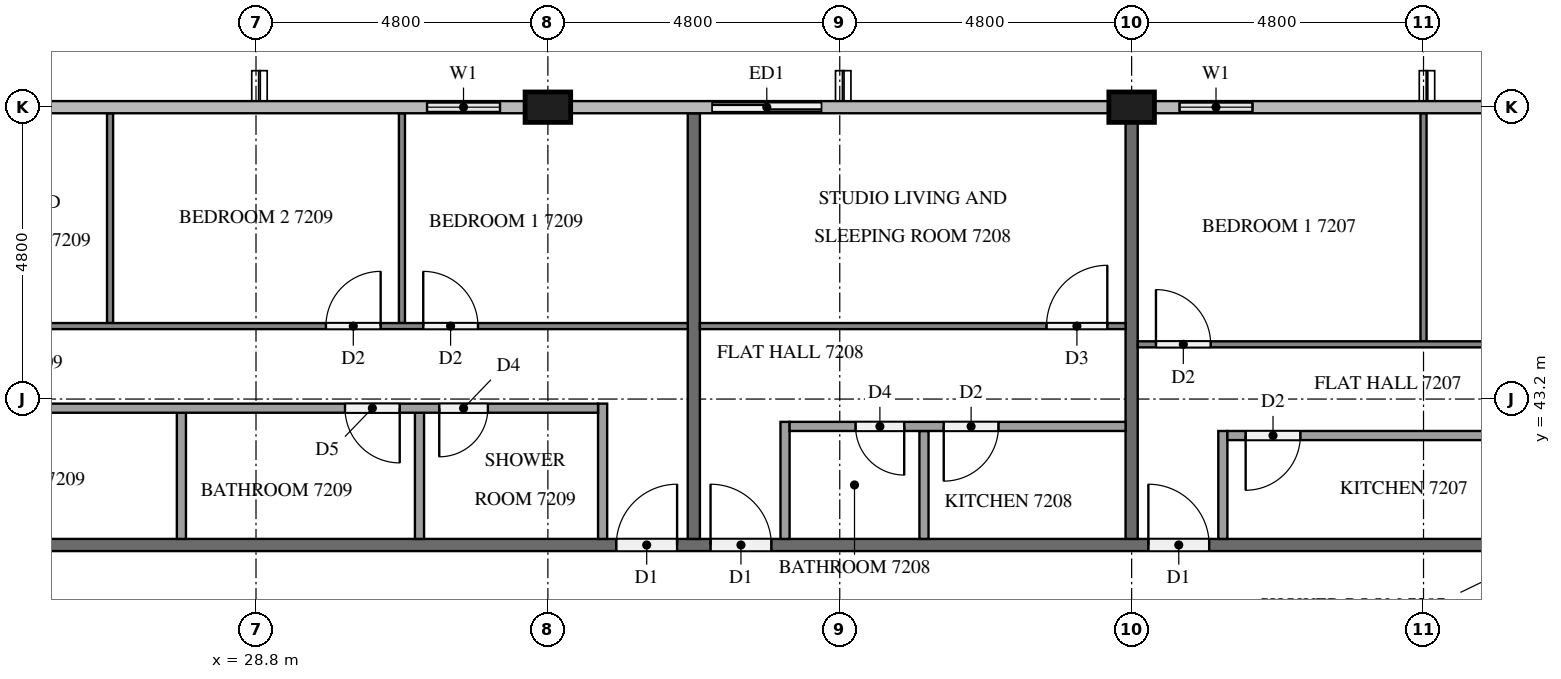
"""IFC4 building model, lengths in metres.
Left out: names, types, materials, properties, quantities, classifications, styles, units other than length and angle.
Written with IfcOpenShell. Run it as: python <this file> out.ifc"""

import sys

from ifc_helpers import new_model, si_unit, direction, frame, frame_2d, origin, origin_2d, place, context, subcontext, project, spatial, rectangle, extrude, element, fill, save


model = new_model("IFC4")
c1 = context("Model", 3, precision=1e-05, world=origin(), true_north=direction((0.0, 1.0)))
c2 = subcontext(c1, "Body", "Model", "MODEL_VIEW")
j1 = project(units=[si_unit("LENGTHUNIT", "METRE"), si_unit("PLANEANGLEUNIT", "RADIAN")], contexts=[c1])
p1 = place(None, origin())
s1 = spatial("IfcSite", under=j1, at=p1, CompositionType="ELEMENT")
p2 = place(p1, origin())
s2 = spatial("IfcBuilding", under=s1, at=p2, CompositionType="ELEMENT")
p3 = place(p2, frame((0.0, 0.0, 275.6)))
s3 = spatial("IfcBuildingStorey", under=s2, at=p3, CompositionType="ELEMENT", Elevation=275.6)
for number, where, z_axis, x_axis in (
    (1, (43.2, 48.0, 0.0), (0.0, 0.0, 1.0), (1.0, 0.0, 0.0)),
    (2, (33.6, 48.0, 0.0), (0.0, 0.0, 1.0), (1.0, 0.0, 0.0)),
):
    element("IfcColumn", number, at=place(p3, frame(where, z_axis=z_axis, x_axis=x_axis)), inside=s3, PredefinedType="COLUMN", context=c2, shape_type="SweptSolid", body=[
        extrude(rectangle(XDim=0.75, YDim=0.5, at=origin_2d()), origin(), (0.0, 0.0, 1.0), 3.2),
    ])
p4 = place(p3, frame((45.6, 48.0, 0.0), z_axis=(0.0, 0.0, 1.0), x_axis=(-1.0, 0.0, 0.0)))
e3 = element("IfcWall", 3, at=p4, inside=s3, PredefinedType="SOLIDWALL", context=c2, shape_type="SweptSolid", body=[
    extrude(rectangle(XDim=2.025, YDim=0.15, at=frame_2d((1.013, 0.0))), origin(), (0.0, 0.0, 1.0), 3.2),
])
p5 = place(p4, frame((0.413, 0.0, 0.9)))
e4 = element("IfcOpeningElement", 4, at=p5, cuts=e3, PredefinedType="OPENING", context=c2, shape_type="SweptSolid", body=[
    extrude(rectangle(XDim=1.2, YDim=1.4, at=frame_2d((0.6, 0.7))), frame((0.0, 0.085, 0.0), z_axis=(0.0, -1.0, 0.0), x_axis=(1.0, 0.0, 0.0)), (0.0, 0.0, 1.0), 0.17),
])
p6 = place(p3, frame((38.4, 48.0, 0.0), z_axis=(0.0, 0.0, 1.0), x_axis=(-1.0, 0.0, 0.0)))
e5 = element("IfcWall", 5, at=p6, inside=s3, PredefinedType="SOLIDWALL", context=c2, shape_type="SweptSolid", body=[
    extrude(rectangle(XDim=2.4, YDim=0.15, at=frame_2d((1.2, 0.0))), origin(), (0.0, 0.0, 1.0), 3.2),
])
p7 = place(p6, frame((0.3, 0.0, 0.0)))
e6 = element("IfcOpeningElement", 6, at=p7, cuts=e5, PredefinedType="OPENING", context=c2, shape_type="SweptSolid", body=[
    extrude(rectangle(XDim=1.8, YDim=2.4, at=frame_2d((0.9, 1.2))), frame((0.0, 0.085, 0.0), z_axis=(0.0, -1.0, 0.0), x_axis=(1.0, 0.0, 0.0)), (0.0, 0.0, 1.0), 0.17),
])
p8 = place(p3, frame((33.225, 48.0, 0.0), z_axis=(0.0, 0.0, 1.0), x_axis=(-1.0, 0.0, 0.0)))
e7 = element("IfcWall", 7, at=p8, inside=s3, PredefinedType="SOLIDWALL", context=c2, shape_type="SweptSolid", body=[
    extrude(rectangle(XDim=2.025, YDim=0.15, at=frame_2d((1.013, 0.0))), origin(), (0.0, 0.0, 1.0), 3.2),
])
p9 = place(p8, frame((0.413, 0.0, 0.9)))
e8 = element("IfcOpeningElement", 8, at=p9, cuts=e7, PredefinedType="OPENING", context=c2, shape_type="SweptSolid", body=[
    extrude(rectangle(XDim=1.2, YDim=1.4, at=frame_2d((0.6, 0.7))), frame((0.0, 0.085, 0.0), z_axis=(0.0, -1.0, 0.0), x_axis=(1.0, 0.0, 0.0)), (0.0, 0.0, 1.0), 0.17),
])
p10 = place(p3, frame((11.9, 40.8, 0.0), z_axis=(0.0, 0.0, 1.0), x_axis=(1.0, 0.0, 0.0)))
e9 = element("IfcWall", 9, at=p10, inside=s3, PredefinedType="PARTITIONING", context=c2, shape_type="SweptSolid", body=[
    extrude(rectangle(XDim=38.6, YDim=0.2, at=frame_2d((19.3, 0.0))), origin(), (0.0, 0.0, 1.0), 3.2),
])
p11 = place(p10, frame((31.575, 0.0, 0.0)))
e10 = element("IfcOpeningElement", 10, at=p11, cuts=e9, PredefinedType="OPENING", context=c2, shape_type="SweptSolid", body=[
    extrude(rectangle(XDim=1.0, YDim=2.1, at=frame_2d((0.5, 1.05))), frame((0.0, 0.11, 0.0), z_axis=(0.0, -1.0, 0.0), x_axis=(1.0, 0.0, 0.0)), (0.0, 0.0, 1.0), 0.22),
])
p12 = place(p10, frame((24.375, 0.0, 0.0)))
e11 = element("IfcOpeningElement", 11, at=p12, cuts=e9, PredefinedType="OPENING", context=c2, shape_type="SweptSolid", body=[
    extrude(rectangle(XDim=1.0, YDim=2.1, at=frame_2d((0.5, 1.05))), frame((0.0, 0.11, 0.0), z_axis=(0.0, -1.0, 0.0), x_axis=(1.0, 0.0, 0.0)), (0.0, 0.0, 1.0), 0.22),
])
p13 = place(p10, frame((22.825, 0.0, 0.0)))
e12 = element("IfcOpeningElement", 12, at=p13, cuts=e9, PredefinedType="OPENING", context=c2, shape_type="SweptSolid", body=[
    extrude(rectangle(XDim=1.0, YDim=2.1, at=frame_2d((0.5, 1.05))), frame((0.0, 0.11, 0.0), z_axis=(0.0, -1.0, 0.0), x_axis=(1.0, 0.0, 0.0)), (0.0, 0.0, 1.0), 0.22),
])
p14 = place(p10, frame((0.375, 0.0, 0.0)))
e13 = element("IfcOpeningElement", 13, at=p14, cuts=e9, PredefinedType="OPENING", context=c2, shape_type="SweptSolid", body=[
    extrude(rectangle(XDim=1.0, YDim=2.1, at=frame_2d((0.5, 1.05))), frame((0.0, 0.11, 0.0), z_axis=(0.0, -1.0, 0.0), x_axis=(1.0, 0.0, 0.0)), (0.0, 0.0, 1.0), 0.22),
])
p15 = place(p3, frame((43.2, 47.75, 0.0), z_axis=(0.0, 0.0, 1.0), x_axis=(0.0, -1.0, 0.0)))
e14 = element("IfcWall", 14, at=p15, inside=s3, PredefinedType="PARTITIONING", context=c2, shape_type="SweptSolid", body=[
    extrude(rectangle(XDim=6.85, YDim=0.2, at=frame_2d((3.425, 0.0))), origin(), (0.0, 0.0, 1.0), 3.2),
])
p16 = place(p3, frame((36.0, 47.9, 0.0), z_axis=(0.0, 0.0, 1.0), x_axis=(0.0, -1.0, 0.0)))
e15 = element("IfcWall", 15, at=p16, inside=s3, PredefinedType="PARTITIONING", context=c2, shape_type="SweptSolid", body=[
    extrude(rectangle(XDim=7.0, YDim=0.2, at=frame_2d((3.5, 0.0))), origin(), (0.0, 0.0, 1.0), 3.2),
])
p17 = place(p3, frame((48.0, 44.15, 0.0), z_axis=(0.0, 0.0, 1.0), x_axis=(0.0, 1.0, 0.0)))
e16 = element("IfcWall", 16, at=p17, inside=s3, PredefinedType="PARTITIONING", context=c2, shape_type="SweptSolid", body=[
    extrude(rectangle(XDim=3.75, YDim=0.1, at=frame_2d((1.875, 0.0))), origin(), (0.0, 0.0, 1.0), 3.2),
])
p18 = place(p3, frame((43.3, 44.1, 0.0), z_axis=(0.0, 0.0, 1.0), x_axis=(1.0, 0.0, 0.0)))
e17 = element("IfcWall", 17, at=p18, inside=s3, PredefinedType="PARTITIONING", context=c2, shape_type="SweptSolid", body=[
    extrude(rectangle(XDim=13.959, YDim=0.1, at=frame_2d((6.979, 0.0))), origin(), (0.0, 0.0, 1.0), 3.2),
])
p19 = place(p18, frame((0.3, 0.0, 0.0)))
e18 = element("IfcOpeningElement", 18, at=p19, cuts=e17, PredefinedType="OPENING", context=c2, shape_type="SweptSolid", body=[
    extrude(rectangle(XDim=0.9, YDim=2.1, at=frame_2d((0.45, 1.05))), frame((0.0, 0.06, 0.0), z_axis=(0.0, -1.0, 0.0), x_axis=(1.0, 0.0, 0.0)), (0.0, 0.0, 1.0), 0.12),
])
p20 = place(p18, frame((8.25, 0.0, 0.0)))
e19 = element("IfcOpeningElement", 19, at=p20, cuts=e17, PredefinedType="OPENING", context=c2, shape_type="SweptSolid", body=[
    extrude(rectangle(XDim=0.9, YDim=2.1, at=frame_2d((0.45, 1.05))), frame((0.0, 0.06, 0.0), z_axis=(0.0, -1.0, 0.0), x_axis=(1.0, 0.0, 0.0)), (0.0, 0.0, 1.0), 0.12),
])
p21 = place(p18, frame((9.85, 0.0, 0.0)))
e20 = element("IfcOpeningElement", 20, at=p21, cuts=e17, PredefinedType="OPENING", context=c2, shape_type="SweptSolid", body=[
    extrude(rectangle(XDim=1.0, YDim=2.1, at=frame_2d((0.5, 1.05))), frame((0.0, 0.06, 0.0), z_axis=(0.0, -1.0, 0.0), x_axis=(1.0, 0.0, 0.0)), (0.0, 0.0, 1.0), 0.12),
])
p22 = place(p3, frame((44.7, 40.9, 0.0), z_axis=(0.0, 0.0, 1.0), x_axis=(0.0, 1.0, 0.0)))
e21 = element("IfcWall", 21, at=p22, inside=s3, PredefinedType="PARTITIONING", context=c2, shape_type="SweptSolid", body=[
    extrude(rectangle(XDim=1.775, YDim=0.15, at=frame_2d((0.888, 0.0))), origin(), (0.0, 0.0, 1.0), 3.2),
])
p23 = place(p3, frame((57.5, 42.6, 0.0), z_axis=(0.0, 0.0, 1.0), x_axis=(-1.0, 0.0, 0.0)))
e22 = element("IfcWall", 22, at=p23, inside=s3, PredefinedType="PARTITIONING", context=c2, shape_type="SweptSolid", body=[
    extrude(rectangle(XDim=12.725, YDim=0.15, at=frame_2d((6.363, 0.0))), origin(), (0.0, 0.0, 1.0), 3.2),
])
p24 = place(p23, frame((11.525, 0.0, 0.0)))
e23 = element("IfcOpeningElement", 23, at=p24, cuts=e22, PredefinedType="OPENING", context=c2, shape_type="SweptSolid", body=[
    extrude(rectangle(XDim=0.9, YDim=2.1, at=frame_2d((0.45, 1.05))), frame((0.0, 0.085, 0.0), z_axis=(0.0, -1.0, 0.0), x_axis=(1.0, 0.0, 0.0)), (0.0, 0.0, 1.0), 0.17),
])
p25 = place(p23, frame((4.24, 0.0, 0.0)))
e24 = element("IfcOpeningElement", 24, at=p25, cuts=e22, PredefinedType="OPENING", context=c2, shape_type="SweptSolid", body=[
    extrude(rectangle(XDim=0.8, YDim=2.1, at=frame_2d((0.4, 1.05))), frame((0.0, 0.085, 0.0), z_axis=(0.0, -1.0, 0.0), x_axis=(1.0, 0.0, 0.0)), (0.0, 0.0, 1.0), 0.17),
])
p26 = place(p23, frame((2.69, 0.0, 0.0)))
e25 = element("IfcOpeningElement", 25, at=p26, cuts=e22, PredefinedType="OPENING", context=c2, shape_type="SweptSolid", body=[
    extrude(rectangle(XDim=0.9, YDim=2.1, at=frame_2d((0.45, 1.05))), frame((0.0, 0.085, 0.0), z_axis=(0.0, -1.0, 0.0), x_axis=(1.0, 0.0, 0.0)), (0.0, 0.0, 1.0), 0.17),
])
p27 = place(p3, frame((36.1, 44.4, 0.0), z_axis=(0.0, 0.0, 1.0), x_axis=(1.0, 0.0, 0.0)))
e26 = element("IfcWall", 26, at=p27, inside=s3, PredefinedType="PARTITIONING", context=c2, shape_type="SweptSolid", body=[
    extrude(rectangle(XDim=7.0, YDim=0.1, at=frame_2d((3.5, 0.0))), origin(), (0.0, 0.0, 1.0), 3.2),
])
p28 = place(p27, frame((5.7, 0.0, 0.0)))
e27 = element("IfcOpeningElement", 27, at=p28, cuts=e26, PredefinedType="OPENING", context=c2, shape_type="SweptSolid", body=[
    extrude(rectangle(XDim=1.0, YDim=2.1, at=frame_2d((0.5, 1.05))), frame((0.0, 0.06, 0.0), z_axis=(0.0, -1.0, 0.0), x_axis=(1.0, 0.0, 0.0)), (0.0, 0.0, 1.0), 0.12),
])
p29 = place(p3, frame((39.785, 40.9, 0.0), z_axis=(0.0, 0.0, 1.0), x_axis=(0.0, 1.0, 0.0)))
e28 = element("IfcWall", 28, at=p29, inside=s3, PredefinedType="PARTITIONING", context=c2, shape_type="SweptSolid", body=[
    extrude(rectangle(XDim=1.775, YDim=0.15, at=frame_2d((0.888, 0.0))), origin(), (0.0, 0.0, 1.0), 3.2),
])
p30 = place(p3, frame((37.5, 40.9, 0.0), z_axis=(0.0, 0.0, 1.0), x_axis=(0.0, 1.0, 0.0)))
e29 = element("IfcWall", 29, at=p30, inside=s3, PredefinedType="PARTITIONING", context=c2, shape_type="SweptSolid", body=[
    extrude(rectangle(XDim=1.925, YDim=0.15, at=frame_2d((0.962, 0.0))), origin(), (0.0, 0.0, 1.0), 3.2),
])
p31 = place(p3, frame((43.1, 42.75, 0.0), z_axis=(0.0, 0.0, 1.0), x_axis=(-1.0, 0.0, 0.0)))
e30 = element("IfcWall", 30, at=p31, inside=s3, PredefinedType="PARTITIONING", context=c2, shape_type="SweptSolid", body=[
    extrude(rectangle(XDim=5.525, YDim=0.15, at=frame_2d((2.763, 0.0))), origin(), (0.0, 0.0, 1.0), 3.2),
])
p32 = place(p31, frame((3.64, 0.0, 0.0)))
e31 = element("IfcOpeningElement", 31, at=p32, cuts=e30, PredefinedType="OPENING", context=c2, shape_type="SweptSolid", body=[
    extrude(rectangle(XDim=0.8, YDim=2.1, at=frame_2d((0.4, 1.05))), frame((0.0, 0.085, 0.0), z_axis=(0.0, -1.0, 0.0), x_axis=(1.0, 0.0, 0.0)), (0.0, 0.0, 1.0), 0.17),
])
p33 = place(p31, frame((2.09, 0.0, 0.0)))
e32 = element("IfcOpeningElement", 32, at=p33, cuts=e30, PredefinedType="OPENING", context=c2, shape_type="SweptSolid", body=[
    extrude(rectangle(XDim=0.9, YDim=2.1, at=frame_2d((0.45, 1.05))), frame((0.0, 0.085, 0.0), z_axis=(0.0, -1.0, 0.0), x_axis=(1.0, 0.0, 0.0)), (0.0, 0.0, 1.0), 0.17),
])
for number, where, z_axis, x_axis in (
    (33, (31.2, 44.45, 0.0), (0.0, 0.0, 1.0), (0.0, 1.0, 0.0)),
    (34, (26.4, 44.45, 0.0), (0.0, 0.0, 1.0), (0.0, 1.0, 0.0)),
):
    element("IfcWall", number, at=place(p3, frame(where, z_axis=z_axis, x_axis=x_axis)), inside=s3, PredefinedType="PARTITIONING", context=c2, shape_type="SweptSolid", body=[
        extrude(rectangle(XDim=3.45, YDim=0.1, at=frame_2d((1.725, 0.0))), origin(), (0.0, 0.0, 1.0), 3.2),
    ])
p34 = place(p3, frame((21.7, 44.4, 0.0), z_axis=(0.0, 0.0, 1.0), x_axis=(1.0, 0.0, 0.0)))
e35 = element("IfcWall", 35, at=p34, inside=s3, PredefinedType="PARTITIONING", context=c2, shape_type="SweptSolid", body=[
    extrude(rectangle(XDim=14.2, YDim=0.1, at=frame_2d((7.1, 0.0))), origin(), (0.0, 0.0, 1.0), 3.2),
])
p35 = place(p34, frame((9.85, 0.0, 0.0)))
e36 = element("IfcOpeningElement", 36, at=p35, cuts=e35, PredefinedType="OPENING", context=c2, shape_type="SweptSolid", body=[
    extrude(rectangle(XDim=0.9, YDim=2.1, at=frame_2d((0.45, 1.05))), frame((0.0, 0.06, 0.0), z_axis=(0.0, -1.0, 0.0), x_axis=(1.0, 0.0, 0.0)), (0.0, 0.0, 1.0), 0.12),
])
p36 = place(p34, frame((8.25, 0.0, 0.0)))
e37 = element("IfcOpeningElement", 37, at=p36, cuts=e35, PredefinedType="OPENING", context=c2, shape_type="SweptSolid", body=[
    extrude(rectangle(XDim=0.9, YDim=2.1, at=frame_2d((0.45, 1.05))), frame((0.0, 0.06, 0.0), z_axis=(0.0, -1.0, 0.0), x_axis=(1.0, 0.0, 0.0)), (0.0, 0.0, 1.0), 0.12),
])
p37 = place(p34, frame((0.3, 0.0, 0.0)))
e38 = element("IfcOpeningElement", 38, at=p37, cuts=e35, PredefinedType="OPENING", context=c2, shape_type="SweptSolid", body=[
    extrude(rectangle(XDim=1.0, YDim=2.1, at=frame_2d((0.5, 1.05))), frame((0.0, 0.06, 0.0), z_axis=(0.0, -1.0, 0.0), x_axis=(1.0, 0.0, 0.0)), (0.0, 0.0, 1.0), 0.12),
])
for number, where, z_axis, x_axis in (
    (39, (31.489, 40.9, 0.0), (0.0, 0.0, 1.0), (0.0, 1.0, 0.0)),
    (40, (27.573, 40.9, 0.0), (0.0, 0.0, 1.0), (0.0, 1.0, 0.0)),
):
    element("IfcWall", number, at=place(p3, frame(where, z_axis=z_axis, x_axis=x_axis)), inside=s3, PredefinedType="PARTITIONING", context=c2, shape_type="SweptSolid", body=[
        extrude(rectangle(XDim=2.075, YDim=0.15, at=frame_2d((1.038, 0.0))), origin(), (0.0, 0.0, 1.0), 3.2),
    ])
p38 = place(p3, frame((34.5, 40.9, 0.0), z_axis=(0.0, 0.0, 1.0), x_axis=(0.0, 1.0, 0.0)))
e41 = element("IfcWall", 41, at=p38, inside=s3, PredefinedType="PARTITIONING", context=c2, shape_type="SweptSolid", body=[
    extrude(rectangle(XDim=2.225, YDim=0.15, at=frame_2d((1.113, 0.0))), origin(), (0.0, 0.0, 1.0), 3.2),
])
p39 = place(p3, frame((34.425, 43.05, 0.0), z_axis=(0.0, 0.0, 1.0), x_axis=(-1.0, 0.0, 0.0)))
e42 = element("IfcWall", 42, at=p39, inside=s3, PredefinedType="PARTITIONING", context=c2, shape_type="SweptSolid", body=[
    extrude(rectangle(XDim=12.725, YDim=0.15, at=frame_2d((6.363, 0.0))), origin(), (0.0, 0.0, 1.0), 3.2),
])
p40 = place(p39, frame((1.812, 0.0, 0.0)))
e43 = element("IfcOpeningElement", 43, at=p40, cuts=e42, PredefinedType="OPENING", context=c2, shape_type="SweptSolid", body=[
    extrude(rectangle(XDim=0.8, YDim=2.1, at=frame_2d((0.4, 1.05))), frame((0.0, 0.085, 0.0), z_axis=(0.0, -1.0, 0.0), x_axis=(1.0, 0.0, 0.0)), (0.0, 0.0, 1.0), 0.17),
])
p41 = place(p39, frame((3.261, 0.0, 0.0)))
e44 = element("IfcOpeningElement", 44, at=p41, cuts=e42, PredefinedType="OPENING", context=c2, shape_type="SweptSolid", body=[
    extrude(rectangle(XDim=0.9, YDim=2.1, at=frame_2d((0.45, 1.05))), frame((0.0, 0.085, 0.0), z_axis=(0.0, -1.0, 0.0), x_axis=(1.0, 0.0, 0.0)), (0.0, 0.0, 1.0), 0.17),
])
p42 = place(p39, frame((11.475, 0.0, 0.0)))
e45 = element("IfcOpeningElement", 45, at=p42, cuts=e42, PredefinedType="OPENING", context=c2, shape_type="SweptSolid", body=[
    extrude(rectangle(XDim=0.9, YDim=2.1, at=frame_2d((0.45, 1.05))), frame((0.0, 0.085, 0.0), z_axis=(0.0, -1.0, 0.0), x_axis=(1.0, 0.0, 0.0)), (0.0, 0.0, 1.0), 0.17),
])
p43 = place(p5, origin())
e46 = element("IfcWindow", 46, at=p43, inside=s3, PartitioningType="SINGLE_PANEL", PredefinedType="WINDOW", context=c2, shape_type="SweptSolid", body=[
    extrude(rectangle(XDim=1.2, YDim=1.4, at=frame_2d((0.6, 0.7))), frame((0.0, 0.03, 0.0), z_axis=(0.0, -1.0, 0.0), x_axis=(1.0, 0.0, 0.0)), (0.0, 0.0, 1.0), 0.06),
])
fill(e4, e46)
p44 = place(p7, origin())
e47 = element("IfcDoor", 47, at=p44, inside=s3, OperationType="SLIDING_TO_RIGHT", PredefinedType="DOOR", context=c2, shape_type="SweptSolid", body=[
    extrude(rectangle(XDim=1.8, YDim=2.4, at=frame_2d((0.9, 1.2))), frame((0.0, 0.025, 0.0), z_axis=(0.0, -1.0, 0.0), x_axis=(1.0, 0.0, 0.0)), (0.0, 0.0, 1.0), 0.05),
])
fill(e6, e47)
p45 = place(p9, origin())
e48 = element("IfcWindow", 48, at=p45, inside=s3, PartitioningType="SINGLE_PANEL", PredefinedType="WINDOW", context=c2, shape_type="SweptSolid", body=[
    extrude(rectangle(XDim=1.2, YDim=1.4, at=frame_2d((0.6, 0.7))), frame((0.0, 0.03, 0.0), z_axis=(0.0, -1.0, 0.0), x_axis=(1.0, 0.0, 0.0)), (0.0, 0.0, 1.0), 0.06),
])
fill(e8, e48)
p46 = place(p11, origin())
e49 = element("IfcDoor", 49, at=p46, inside=s3, OperationType="SINGLE_SWING_LEFT", PredefinedType="DOOR", context=c2, shape_type="SweptSolid", body=[
    extrude(rectangle(XDim=1.0, YDim=2.1, at=frame_2d((0.5, 1.05))), frame((0.0, 0.025, 0.0), z_axis=(0.0, -1.0, 0.0), x_axis=(1.0, 0.0, 0.0)), (0.0, 0.0, 1.0), 0.05),
])
fill(e10, e49)
p47 = place(p12, origin())
e50 = element("IfcDoor", 50, at=p47, inside=s3, OperationType="SINGLE_SWING_LEFT", PredefinedType="DOOR", context=c2, shape_type="SweptSolid", body=[
    extrude(rectangle(XDim=1.0, YDim=2.1, at=frame_2d((0.5, 1.05))), frame((0.0, 0.025, 0.0), z_axis=(0.0, -1.0, 0.0), x_axis=(1.0, 0.0, 0.0)), (0.0, 0.0, 1.0), 0.05),
])
fill(e11, e50)
p48 = place(p13, origin())
e51 = element("IfcDoor", 51, at=p48, inside=s3, OperationType="SINGLE_SWING_RIGHT", PredefinedType="DOOR", context=c2, shape_type="SweptSolid", body=[
    extrude(rectangle(XDim=1.0, YDim=2.1, at=frame_2d((0.5, 1.05))), frame((0.0, 0.025, 0.0), z_axis=(0.0, -1.0, 0.0), x_axis=(1.0, 0.0, 0.0)), (0.0, 0.0, 1.0), 0.05),
])
fill(e12, e51)
p49 = place(p19, origin())
e52 = element("IfcDoor", 52, at=p49, inside=s3, OperationType="SINGLE_SWING_LEFT", PredefinedType="DOOR", context=c2, shape_type="SweptSolid", body=[
    extrude(rectangle(XDim=0.9, YDim=2.1, at=frame_2d((0.45, 1.05))), frame((0.0, 0.025, 0.0), z_axis=(0.0, -1.0, 0.0), x_axis=(1.0, 0.0, 0.0)), (0.0, 0.0, 1.0), 0.05),
])
fill(e18, e52)
p50 = place(p24, origin())
e53 = element("IfcDoor", 53, at=p50, inside=s3, OperationType="SINGLE_SWING_RIGHT", PredefinedType="DOOR", context=c2, shape_type="SweptSolid", body=[
    extrude(rectangle(XDim=0.9, YDim=2.1, at=frame_2d((0.45, 1.05))), frame((0.0, 0.025, 0.0), z_axis=(0.0, -1.0, 0.0), x_axis=(1.0, 0.0, 0.0)), (0.0, 0.0, 1.0), 0.05),
])
fill(e23, e53)
p51 = place(p28, origin())
e54 = element("IfcDoor", 54, at=p51, inside=s3, OperationType="SINGLE_SWING_RIGHT", PredefinedType="DOOR", context=c2, shape_type="SweptSolid", body=[
    extrude(rectangle(XDim=1.0, YDim=2.1, at=frame_2d((0.5, 1.05))), frame((0.0, 0.025, 0.0), z_axis=(0.0, -1.0, 0.0), x_axis=(1.0, 0.0, 0.0)), (0.0, 0.0, 1.0), 0.05),
])
fill(e27, e54)
p52 = place(p32, origin())
e55 = element("IfcDoor", 55, at=p52, inside=s3, OperationType="SINGLE_SWING_LEFT", PredefinedType="DOOR", context=c2, shape_type="SweptSolid", body=[
    extrude(rectangle(XDim=0.8, YDim=2.1, at=frame_2d((0.4, 1.05))), frame((0.0, 0.025, 0.0), z_axis=(0.0, -1.0, 0.0), x_axis=(1.0, 0.0, 0.0)), (0.0, 0.0, 1.0), 0.05),
])
fill(e31, e55)
p53 = place(p33, origin())
e56 = element("IfcDoor", 56, at=p53, inside=s3, OperationType="SINGLE_SWING_RIGHT", PredefinedType="DOOR", context=c2, shape_type="SweptSolid", body=[
    extrude(rectangle(XDim=0.9, YDim=2.1, at=frame_2d((0.45, 1.05))), frame((0.0, 0.025, 0.0), z_axis=(0.0, -1.0, 0.0), x_axis=(1.0, 0.0, 0.0)), (0.0, 0.0, 1.0), 0.05),
])
fill(e32, e56)
p54 = place(p35, origin())
e57 = element("IfcDoor", 57, at=p54, inside=s3, OperationType="SINGLE_SWING_LEFT", PredefinedType="DOOR", context=c2, shape_type="SweptSolid", body=[
    extrude(rectangle(XDim=0.9, YDim=2.1, at=frame_2d((0.45, 1.05))), frame((0.0, 0.025, 0.0), z_axis=(0.0, -1.0, 0.0), x_axis=(1.0, 0.0, 0.0)), (0.0, 0.0, 1.0), 0.05),
])
fill(e36, e57)
p55 = place(p36, origin())
e58 = element("IfcDoor", 58, at=p55, inside=s3, OperationType="SINGLE_SWING_RIGHT", PredefinedType="DOOR", context=c2, shape_type="SweptSolid", body=[
    extrude(rectangle(XDim=0.9, YDim=2.1, at=frame_2d((0.45, 1.05))), frame((0.0, 0.025, 0.0), z_axis=(0.0, -1.0, 0.0), x_axis=(1.0, 0.0, 0.0)), (0.0, 0.0, 1.0), 0.05),
])
fill(e37, e58)
p56 = place(p40, origin())
e59 = element("IfcDoor", 59, at=p56, inside=s3, OperationType="SINGLE_SWING_RIGHT", PredefinedType="DOOR", context=c2, shape_type="SweptSolid", body=[
    extrude(rectangle(XDim=0.8, YDim=2.1, at=frame_2d((0.4, 1.05))), frame((0.0, 0.025, 0.0), z_axis=(0.0, -1.0, 0.0), x_axis=(1.0, 0.0, 0.0)), (0.0, 0.0, 1.0), 0.05),
])
fill(e43, e59)
p57 = place(p41, origin())
e60 = element("IfcDoor", 60, at=p57, inside=s3, OperationType="SINGLE_SWING_LEFT", PredefinedType="DOOR", context=c2, shape_type="SweptSolid", body=[
    extrude(rectangle(XDim=0.9, YDim=2.1, at=frame_2d((0.45, 1.05))), frame((0.0, 0.025, 0.0), z_axis=(0.0, -1.0, 0.0), x_axis=(1.0, 0.0, 0.0)), (0.0, 0.0, 1.0), 0.05),
])
fill(e44, e60)
save(model, sys.argv[1])
